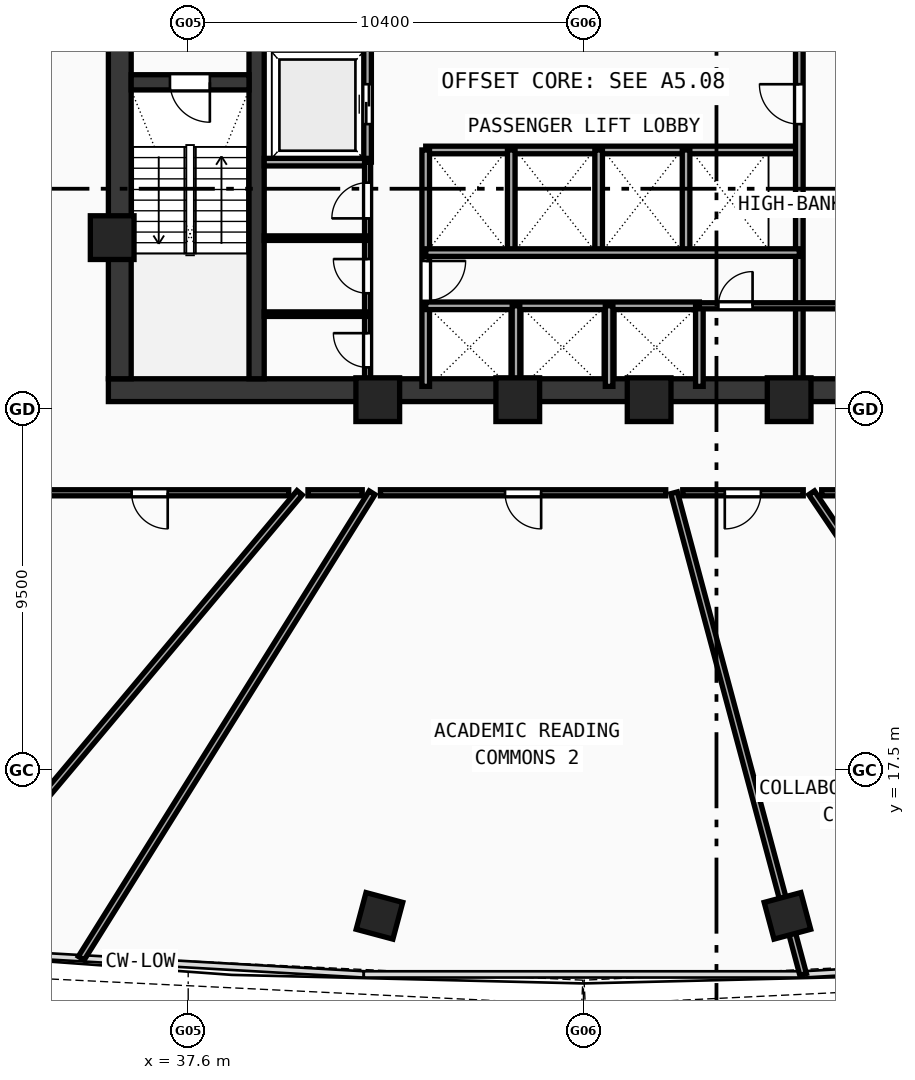
"""IFC4 building model, lengths in metres.
Left out: names, types, materials, properties, quantities, classifications, styles, units other than length and angle.
Written with IfcOpenShell. Run it as: python <this file> out.ifc"""

import sys

from ifc_helpers import new_model, si_unit, direction, frame, frame_2d, origin, origin_with_axes, origin_2d, place, context, subcontext, project, spatial, rectangle, hollow_rectangle, extrude, source, transform, mapped, element, fill, save


model = new_model("IFC4")
c1 = context("Model", 3, precision=1e-05, world=origin(), true_north=direction((0.0, 1.0)))
c2 = subcontext(c1, "Body", "Model", "MODEL_VIEW")
j1 = project(units=[si_unit("LENGTHUNIT", "METRE"), si_unit("PLANEANGLEUNIT", "RADIAN")], contexts=[c1])
p1 = place(None, origin())
s1 = spatial("IfcSite", under=j1, at=p1, CompositionType="ELEMENT")
p2 = place(p1, origin())
s2 = spatial("IfcBuilding", under=s1, at=p2, CompositionType="ELEMENT")
p3 = place(p2, frame((0.0, 0.0, 103.98)))
s3 = spatial("IfcBuildingStorey", under=s2, at=p3, CompositionType="ELEMENT", Elevation=103.98)
p4 = place(p3, frame((35.5, 27.5, 0.0), z_axis=(0.0, 0.0, 1.0), x_axis=(1.0, 0.0, 0.0)))
e1 = element("IfcWall", 1, at=p4, inside=s3, PredefinedType="SHEAR", context=c2, shape_type="SweptSolid", body=[
    extrude(rectangle(XDim=25.0, YDim=0.6, at=frame_2d((12.5, 0.0))), origin(), (0.0, 0.0, 1.0), 3.54),
])
p5 = place(p3, frame((35.8, 27.8, 0.0), z_axis=(0.0, 0.0, 1.0), x_axis=(0.0, 1.0, 0.0)))
e2 = element("IfcWall", 2, at=p5, inside=s3, PredefinedType="SHEAR", context=c2, shape_type="SweptSolid", body=[
    extrude(rectangle(XDim=12.1, YDim=0.6, at=frame_2d((6.05, 0.0))), origin(), (0.0, 0.0, 1.0), 3.54),
])
p6 = place(p3, frame((39.4, 27.8, 0.0), z_axis=(0.0, 0.0, 1.0), x_axis=(0.0, 1.0, 0.0)))
e3 = element("IfcWall", 3, at=p6, inside=s3, PredefinedType="SHEAR", context=c2, shape_type="SweptSolid", body=[
    extrude(rectangle(XDim=12.1, YDim=0.4, at=frame_2d((6.05, 0.0))), origin(), (0.0, 0.0, 1.0), 3.54),
])
p7 = place(p6, frame((9.95, 0.0, 0.0)))
e4 = element("IfcOpeningElement", 4, at=p7, cuts=e3, PredefinedType="OPENING", context=c2, shape_type="SweptSolid", body=[
    extrude(rectangle(XDim=1.1, YDim=2.1, at=frame_2d((0.55, 1.05))), frame((0.0, 0.21, 0.0), z_axis=(0.0, -1.0, 0.0), x_axis=(1.0, 0.0, 0.0)), (0.0, 0.0, 1.0), 0.42),
])
p8 = place(p3, frame((36.1, 35.6, 0.0), z_axis=(0.0, 0.0, 1.0), x_axis=(1.0, 0.0, 0.0)))
e5 = element("IfcWall", 5, at=p8, inside=s3, PredefinedType="SHEAR", context=c2, shape_type="SweptSolid", body=[
    extrude(rectangle(XDim=3.1, YDim=0.4, at=frame_2d((1.55, 0.0))), origin(), (0.0, 0.0, 1.0), 3.54),
])
p9 = place(p8, frame((1.02, 0.0, 0.0)))
e6 = element("IfcOpeningElement", 6, at=p9, cuts=e5, PredefinedType="OPENING", context=c2, shape_type="SweptSolid", body=[
    extrude(rectangle(XDim=1.05, YDim=2.1, at=frame_2d((0.525, 1.05))), frame((0.0, 0.21, 0.0), z_axis=(0.0, -1.0, 0.0), x_axis=(1.0, 0.0, 0.0)), (0.0, 0.0, 1.0), 0.42),
])
m1 = source(origin(), c2, "Body", "SweptSolid", [
    extrude(hollow_rectangle(XDim=1.15, YDim=1.15, WallThickness=0.048, at=origin_2d()), origin(), (0.0, 0.0, 1.0), 3.8),
])
for number, where, z_axis, x_axis in (
    (7, (42.588, 27.25, -0.26), (0.0, 0.0, 1.0), (1.0, 0.0, 0.0)),
    (8, (46.272, 27.25, -0.26), (0.0, 0.0, 1.0), (1.0, 0.0, 0.0)),
    (9, (49.729, 27.25, -0.26), (0.0, 0.0, 1.0), (1.0, 0.0, 0.0)),
    (10, (53.412, 27.25, -0.26), (0.0, 0.0, 1.0), (1.0, 0.0, 0.0)),
    (11, (35.6, 31.513, -0.26), (0.0, 0.0, 1.0), (1.0, 0.0, 0.0)),
):
    element("IfcColumn", number, at=place(p3, frame(where, z_axis=z_axis, x_axis=x_axis)), inside=s3, PredefinedType="COLUMN", context=c2, shape_type="MappedRepresentation", body=[
        mapped(m1, transform((0.0, 0.0, 0.0), scale=1.0)),
    ])
m2 = source(origin(), c2, "Body", "SweptSolid", [
    extrude(hollow_rectangle(XDim=1.0, YDim=1.0, WallThickness=0.042, at=origin_2d()), origin(), (0.0, 0.0, 1.0), 3.8),
])
for number, where, z_axis, x_axis in (
    (12, (42.633, 13.668, -0.26), (0.0, 0.0, 1.0), (0.966, -0.259, 0.0)),
    (13, (53.367, 13.668, -0.26), (0.0, 0.0, 1.0), (0.966, 0.259, 0.0)),
):
    element("IfcColumn", number, at=place(p3, frame(where, z_axis=z_axis, x_axis=x_axis)), inside=s3, PredefinedType="COLUMN", context=c2, shape_type="MappedRepresentation", body=[
        mapped(m2, transform((0.0, 0.0, 0.0), scale=1.0)),
    ])
p10 = place(p3, frame((42.32, 33.5, 0.0), z_axis=(0.0, 0.0, 1.0), x_axis=(0.0, 1.0, 0.0)))
e14 = element("IfcWall", 14, at=p10, inside=s3, PredefinedType="SOLIDWALL", context=c2, shape_type="SweptSolid", body=[
    extrude(rectangle(XDim=6.45, YDim=0.2, at=frame_2d((3.225, 0.0))), origin(), (0.0, 0.0, 1.0), 3.54),
])
p11 = place(p10, frame((1.0, 0.0, 0.0)))
e15 = element("IfcOpeningElement", 15, at=p11, cuts=e14, PredefinedType="OPENING", context=c2, shape_type="SweptSolid", body=[
    extrude(rectangle(XDim=1.05, YDim=2.1, at=frame_2d((0.525, 1.05))), frame((0.0, 0.11, 0.0), z_axis=(0.0, -1.0, 0.0), x_axis=(1.0, 0.0, 0.0)), (0.0, 0.0, 1.0), 0.22),
])
p12 = place(p3, frame((39.6, 33.5, 0.0), z_axis=(0.0, 0.0, 1.0), x_axis=(1.0, 0.0, 0.0)))
e16 = element("IfcWall", 16, at=p12, inside=s3, PredefinedType="SOLIDWALL", context=c2, shape_type="SweptSolid", body=[
    extrude(rectangle(XDim=2.72, YDim=0.2, at=frame_2d((1.36, 0.0))), origin(), (0.0, 0.0, 1.0), 3.54),
])
p13 = place(p3, frame((43.85, 33.82, 0.0), z_axis=(0.0, 0.0, 1.0), x_axis=(1.0, 0.0, 0.0)))
e17 = element("IfcWall", 17, at=p13, inside=s3, PredefinedType="SOLIDWALL", context=c2, shape_type="SweptSolid", body=[
    extrude(rectangle(XDim=9.83, YDim=0.2, at=frame_2d((4.915, 0.0))), origin(), (0.0, 0.0, 1.0), 3.54),
])
p14 = place(p3, frame((43.85, 27.6, 0.0), z_axis=(0.0, 0.0, 1.0), x_axis=(0.0, 1.0, 0.0)))
e18 = element("IfcWall", 18, at=p14, inside=s3, PredefinedType="SOLIDWALL", context=c2, shape_type="SweptSolid", body=[
    extrude(rectangle(XDim=6.22, YDim=0.2, at=frame_2d((3.11, 0.0))), origin(), (0.0, 0.0, 1.0), 3.54),
])
p15 = place(p14, frame((2.25, 0.0, 0.0)))
e19 = element("IfcOpeningElement", 19, at=p15, cuts=e18, PredefinedType="OPENING", context=c2, shape_type="SweptSolid", body=[
    extrude(rectangle(XDim=1.05, YDim=2.1, at=frame_2d((0.525, 1.05))), frame((0.0, 0.11, 0.0), z_axis=(0.0, -1.0, 0.0), x_axis=(1.0, 0.0, 0.0)), (0.0, 0.0, 1.0), 0.22),
])
p16 = place(p3, frame((53.68, 27.6, 0.0), z_axis=(0.0, 0.0, 1.0), x_axis=(0.0, 1.0, 0.0)))
e20 = element("IfcWall", 20, at=p16, inside=s3, PredefinedType="SOLIDWALL", context=c2, shape_type="SweptSolid", body=[
    extrude(rectangle(XDim=9.05, YDim=0.2, at=frame_2d((4.525, 0.0))), origin(), (0.0, 0.0, 1.0), 3.54),
])
p17 = place(p16, frame((6.9, 0.0, 0.0)))
e21 = element("IfcOpeningElement", 21, at=p17, cuts=e20, PredefinedType="OPENING", context=c2, shape_type="SweptSolid", body=[
    extrude(rectangle(XDim=1.05, YDim=2.1, at=frame_2d((0.525, 1.05))), frame((0.0, 0.11, 0.0), z_axis=(0.0, -1.0, 0.0), x_axis=(1.0, 0.0, 0.0)), (0.0, 0.0, 1.0), 0.22),
])
for number, where, z_axis, x_axis in (
    (22, (46.1, 31.12, 0.0), (0.0, 0.0, 1.0), (0.0, 1.0, 0.0)),
    (23, (48.4, 31.12, 0.0), (0.0, 0.0, 1.0), (0.0, 1.0, 0.0)),
    (24, (50.7, 31.12, 0.0), (0.0, 0.0, 1.0), (0.0, 1.0, 0.0)),
):
    element("IfcWall", number, at=place(p3, frame(where, z_axis=z_axis, x_axis=x_axis)), inside=s3, PredefinedType="SOLIDWALL", context=c2, shape_type="SweptSolid", body=[
        extrude(rectangle(XDim=2.7, YDim=0.2, at=frame_2d((1.35, 0.0))), origin(), (0.0, 0.0, 1.0), 3.54),
    ])
p18 = place(p3, frame((43.85, 29.72, 0.0), z_axis=(0.0, 0.0, 1.0), x_axis=(1.0, 0.0, 0.0)))
e25 = element("IfcWall", 25, at=p18, inside=s3, PredefinedType="SOLIDWALL", context=c2, shape_type="SweptSolid", body=[
    extrude(rectangle(XDim=7.2, YDim=0.2, at=frame_2d((3.6, 0.0))), origin(), (0.0, 0.0, 1.0), 3.54),
])
p19 = place(p3, frame((51.05, 27.6, 0.0), z_axis=(0.0, 0.0, 1.0), x_axis=(0.0, 1.0, 0.0)))
e26 = element("IfcWall", 26, at=p19, inside=s3, PredefinedType="SOLIDWALL", context=c2, shape_type="SweptSolid", body=[
    extrude(rectangle(XDim=2.12, YDim=0.2, at=frame_2d((1.06, 0.0))), origin(), (0.0, 0.0, 1.0), 3.54),
])
p20 = place(p3, frame((43.85, 31.12, 0.0), z_axis=(0.0, 0.0, 1.0), x_axis=(1.0, 0.0, 0.0)))
e27 = element("IfcWall", 27, at=p20, inside=s3, PredefinedType="SOLIDWALL", context=c2, shape_type="SweptSolid", body=[
    extrude(rectangle(XDim=9.83, YDim=0.2, at=frame_2d((4.915, 0.0))), origin(), (0.0, 0.0, 1.0), 3.54),
])
for number, where, z_axis, x_axis in (
    (28, (46.225, 27.6, 0.0), (0.0, 0.0, 1.0), (0.0, 1.0, 0.0)),
    (29, (48.675, 27.6, 0.0), (0.0, 0.0, 1.0), (0.0, 1.0, 0.0)),
):
    element("IfcWall", number, at=place(p3, frame(where, z_axis=z_axis, x_axis=x_axis)), inside=s3, PredefinedType="SOLIDWALL", context=c2, shape_type="SweptSolid", body=[
        extrude(rectangle(XDim=2.12, YDim=0.2, at=frame_2d((1.06, 0.0))), origin(), (0.0, 0.0, 1.0), 3.54),
    ])
p21 = place(p3, frame((42.32, 27.6, 0.0), z_axis=(0.0, 0.0, 1.0), x_axis=(0.0, 1.0, 0.0)))
e30 = element("IfcWall", 30, at=p21, inside=s3, PredefinedType="PARTITIONING", context=c2, shape_type="SweptSolid", body=[
    extrude(rectangle(XDim=5.9, YDim=0.16, at=frame_2d((2.95, 0.0))), origin(), (0.0, 0.0, 1.0), 3.54),
])
p22 = place(p21, frame((0.5, 0.0, 0.0)))
e31 = element("IfcOpeningElement", 31, at=p22, cuts=e30, PredefinedType="OPENING", context=c2, shape_type="SweptSolid", body=[
    extrude(rectangle(XDim=0.9, YDim=2.1, at=frame_2d((0.45, 1.05))), frame((0.0, 0.09, 0.0), z_axis=(0.0, -1.0, 0.0), x_axis=(1.0, 0.0, 0.0)), (0.0, 0.0, 1.0), 0.18),
])
p23 = place(p21, frame((2.45, 0.0, 0.0)))
e32 = element("IfcOpeningElement", 32, at=p23, cuts=e30, PredefinedType="OPENING", context=c2, shape_type="SweptSolid", body=[
    extrude(rectangle(XDim=0.9, YDim=2.1, at=frame_2d((0.45, 1.05))), frame((0.0, 0.09, 0.0), z_axis=(0.0, -1.0, 0.0), x_axis=(1.0, 0.0, 0.0)), (0.0, 0.0, 1.0), 0.18),
])
p24 = place(p21, frame((4.42, 0.0, 0.0)))
e33 = element("IfcOpeningElement", 33, at=p24, cuts=e30, PredefinedType="OPENING", context=c2, shape_type="SweptSolid", body=[
    extrude(rectangle(XDim=0.94, YDim=2.1, at=frame_2d((0.47, 1.05))), frame((0.0, 0.09, 0.0), z_axis=(0.0, -1.0, 0.0), x_axis=(1.0, 0.0, 0.0)), (0.0, 0.0, 1.0), 0.18),
])
p25 = place(p3, frame((51.05, 29.72, 0.0), z_axis=(0.0, 0.0, 1.0), x_axis=(1.0, 0.0, 0.0)))
e34 = element("IfcWall", 34, at=p25, inside=s3, PredefinedType="PARTITIONING", context=c2, shape_type="SweptSolid", body=[
    extrude(rectangle(XDim=4.07, YDim=0.16, at=frame_2d((2.035, 0.0))), origin(), (0.0, 0.0, 1.0), 3.54),
])
p26 = place(p25, frame((0.5, 0.0, 0.0)))
e35 = element("IfcOpeningElement", 35, at=p26, cuts=e34, PredefinedType="OPENING", context=c2, shape_type="SweptSolid", body=[
    extrude(rectangle(XDim=0.9, YDim=2.1, at=frame_2d((0.45, 1.05))), frame((0.0, 0.09, 0.0), z_axis=(0.0, -1.0, 0.0), x_axis=(1.0, 0.0, 0.0)), (0.0, 0.0, 1.0), 0.18),
])
for number, where, z_axis, x_axis in (
    (36, (39.6, 29.5, 0.0), (0.0, 0.0, 1.0), (1.0, 0.0, 0.0)),
    (37, (39.6, 31.5, 0.0), (0.0, 0.0, 1.0), (1.0, 0.0, 0.0)),
):
    element("IfcWall", number, at=place(p3, frame(where, z_axis=z_axis, x_axis=x_axis)), inside=s3, PredefinedType="PARTITIONING", context=c2, shape_type="SweptSolid", body=[
        extrude(rectangle(XDim=2.72, YDim=0.12, at=frame_2d((1.36, 0.0))), origin(), (0.0, 0.0, 1.0), 3.54),
    ])
p27 = place(p3, frame((40.532, 24.8, 0.0), z_axis=(0.0, 0.0, 1.0), x_axis=(-0.642779306778, -0.76605141001, 0.0)))
e38 = element("IfcWall", 38, at=p27, inside=s3, PredefinedType="PARTITIONING", context=c2, shape_type="SweptSolid", body=[
    extrude(rectangle(XDim=15.664, YDim=0.18, at=frame_2d((7.832, 0.0))), origin(), (0.0, 0.0, 1.0), 2.84),
])
p28 = place(p3, frame((42.439, 24.8, 0.0), z_axis=(0.0, 0.0, 1.0), x_axis=(-0.529922955224, -0.848045789758, 0.0)))
e39 = element("IfcWall", 39, at=p28, inside=s3, PredefinedType="PARTITIONING", context=c2, shape_type="SweptSolid", body=[
    extrude(rectangle(XDim=14.441, YDim=0.18, at=frame_2d((7.22, 0.0))), origin(), (0.0, 0.0, 1.0), 2.84),
])
p29 = place(p3, frame((50.385, 24.8, 0.0), z_axis=(0.0, 0.0, 1.0), x_axis=(0.258820732199, -0.965925374231, 0.0)))
e40 = element("IfcWall", 40, at=p29, inside=s3, PredefinedType="PARTITIONING", context=c2, shape_type="SweptSolid", body=[
    extrude(rectangle(XDim=13.119, YDim=0.18, at=frame_2d((6.56, 0.0))), origin(), (0.0, 0.0, 1.0), 2.84),
])
p30 = place(p3, frame((54.003, 24.8, 0.0), z_axis=(0.0, 0.0, 1.0), x_axis=(0.559194755778, -0.829036323155, 0.0)))
e41 = element("IfcWall", 41, at=p30, inside=s3, PredefinedType="PARTITIONING", context=c2, shape_type="SweptSolid", body=[
    extrude(rectangle(XDim=14.702, YDim=0.18, at=frame_2d((7.351, 0.0))), origin(), (0.0, 0.0, 1.0), 2.84),
])
p31 = place(p3, frame((55.248, 24.8, 0.0), z_axis=(0.0, 0.0, 1.0), x_axis=(-1.0, 0.0, 0.0)))
e42 = element("IfcWall", 42, at=p31, inside=s3, PredefinedType="PARTITIONING", context=c2, shape_type="SweptSolid", body=[
    extrude(rectangle(XDim=0.979, YDim=0.16, at=frame_2d((0.49, 0.0))), origin(), (0.0, 0.0, 1.0), 2.84),
])
p32 = place(p3, frame((53.783, 24.8, 0.0), z_axis=(0.0, 0.0, 1.0), x_axis=(-1.0, 0.0, 0.0)))
e43 = element("IfcWall", 43, at=p32, inside=s3, PredefinedType="PARTITIONING", context=c2, shape_type="SweptSolid", body=[
    extrude(rectangle(XDim=3.171, YDim=0.16, at=frame_2d((1.585, 0.0))), origin(), (0.0, 0.0, 1.0), 3.54),
])
p33 = place(p32, frame((1.114, 0.0, 0.0)))
e44 = element("IfcOpeningElement", 44, at=p33, cuts=e43, PredefinedType="OPENING", context=c2, shape_type="SweptSolid", body=[
    extrude(rectangle(XDim=0.95, YDim=2.1, at=frame_2d((0.475, 1.05))), frame((0.0, 0.09, 0.0), z_axis=(0.0, -1.0, 0.0), x_axis=(1.0, 0.0, 0.0)), (0.0, 0.0, 1.0), 0.18),
])
p34 = place(p3, frame((50.165, 24.8, 0.0), z_axis=(0.0, 0.0, 1.0), x_axis=(-1.0, 0.0, 0.0)))
e45 = element("IfcWall", 45, at=p34, inside=s3, PredefinedType="PARTITIONING", context=c2, shape_type="SweptSolid", body=[
    extrude(rectangle(XDim=7.506, YDim=0.16, at=frame_2d((3.753, 0.0))), origin(), (0.0, 0.0, 1.0), 2.84),
])
p35 = place(p34, frame((3.278, 0.0, 0.0)))
e46 = element("IfcOpeningElement", 46, at=p35, cuts=e45, PredefinedType="OPENING", context=c2, shape_type="SweptSolid", body=[
    extrude(rectangle(XDim=0.95, YDim=2.1, at=frame_2d((0.475, 1.05))), frame((0.0, 0.09, 0.0), z_axis=(0.0, -1.0, 0.0), x_axis=(1.0, 0.0, 0.0)), (0.0, 0.0, 1.0), 0.18),
])
p36 = place(p3, frame((42.179, 24.8, 0.0), z_axis=(0.0, 0.0, 1.0), x_axis=(-1.0, 0.0, 0.0)))
e47 = element("IfcWall", 47, at=p36, inside=s3, PredefinedType="PARTITIONING", context=c2, shape_type="SweptSolid", body=[
    extrude(rectangle(XDim=1.427, YDim=0.16, at=frame_2d((0.714, 0.0))), origin(), (0.0, 0.0, 1.0), 2.84),
])
p37 = place(p3, frame((40.245, 24.8, 0.0), z_axis=(0.0, 0.0, 1.0), x_axis=(-1.0, 0.0, 0.0)))
e48 = element("IfcWall", 48, at=p37, inside=s3, PredefinedType="PARTITIONING", context=c2, shape_type="SweptSolid", body=[
    extrude(rectangle(XDim=7.145, YDim=0.16, at=frame_2d((3.572, 0.0))), origin(), (0.0, 0.0, 1.0), 3.14),
])
p38 = place(p37, frame((3.184, 0.0, 0.0)))
e49 = element("IfcOpeningElement", 49, at=p38, cuts=e48, PredefinedType="OPENING", context=c2, shape_type="SweptSolid", body=[
    extrude(rectangle(XDim=0.95, YDim=2.1, at=frame_2d((0.475, 1.05))), frame((0.0, 0.09, 0.0), z_axis=(0.0, -1.0, 0.0), x_axis=(1.0, 0.0, 0.0)), (0.0, 0.0, 1.0), 0.18),
])
m3 = source(origin(), c2, "Body", "SweptSolid", [
    extrude(rectangle(XDim=1.05, YDim=2.1, at=frame_2d((0.525, 1.05))), frame((0.0, 0.025, 0.0), z_axis=(0.0, -1.0, 0.0), x_axis=(1.0, 0.0, 0.0)), (0.0, 0.0, 1.0), 0.05),
])
p39 = place(p9, frame((1.05, 0.0, 0.0), z_axis=(0.0, 0.0, 1.0), x_axis=(-1.0, 0.0, 0.0)))
e50 = element("IfcDoor", 50, at=p39, inside=s3, OperationType="SINGLE_SWING_LEFT", PredefinedType="DOOR", context=c2, shape_type="MappedRepresentation", body=[
    mapped(m3, transform((0.0, 0.0, 0.0), scale=1.0)),
])
fill(e6, e50)
p40 = place(p11, origin_with_axes())
e51 = element("IfcDoor", 51, at=p40, inside=s3, OperationType="DOUBLE_DOOR_SLIDING", PredefinedType="DOOR", context=c2, shape_type="MappedRepresentation", body=[
    mapped(m3, transform((0.0, 0.0, 0.0), scale=1.0)),
])
fill(e15, e51)
p41 = place(p15, frame((1.05, 0.0, 0.0), z_axis=(0.0, 0.0, 1.0), x_axis=(-1.0, 0.0, 0.0)))
e52 = element("IfcDoor", 52, at=p41, inside=s3, OperationType="SINGLE_SWING_LEFT", PredefinedType="DOOR", context=c2, shape_type="MappedRepresentation", body=[
    mapped(m3, transform((0.0, 0.0, 0.0), scale=1.0)),
])
fill(e19, e52)
p42 = place(p17, origin_with_axes())
e53 = element("IfcDoor", 53, at=p42, inside=s3, OperationType="SINGLE_SWING_RIGHT", PredefinedType="DOOR", context=c2, shape_type="MappedRepresentation", body=[
    mapped(m3, transform((0.0, 0.0, 0.0), scale=1.0)),
])
fill(e21, e53)
m4 = source(origin(), c2, "Body", "SweptSolid", [
    extrude(rectangle(XDim=0.9, YDim=2.1, at=frame_2d((0.45, 1.05))), frame((0.0, 0.025, 0.0), z_axis=(0.0, -1.0, 0.0), x_axis=(1.0, 0.0, 0.0)), (0.0, 0.0, 1.0), 0.05),
])
p43 = place(p22, origin_with_axes())
e54 = element("IfcDoor", 54, at=p43, inside=s3, OperationType="SINGLE_SWING_RIGHT", PredefinedType="DOOR", context=c2, shape_type="MappedRepresentation", body=[
    mapped(m4, transform((0.0, 0.0, 0.0), scale=1.0)),
])
fill(e31, e54)
p44 = place(p23, origin_with_axes())
e55 = element("IfcDoor", 55, at=p44, inside=s3, OperationType="SINGLE_SWING_RIGHT", PredefinedType="DOOR", context=c2, shape_type="MappedRepresentation", body=[
    mapped(m4, transform((0.0, 0.0, 0.0), scale=1.0)),
])
fill(e32, e55)
m5 = source(origin(), c2, "Body", "SweptSolid", [
    extrude(rectangle(XDim=0.94, YDim=2.1, at=frame_2d((0.47, 1.05))), frame((0.0, 0.025, 0.0), z_axis=(0.0, -1.0, 0.0), x_axis=(1.0, 0.0, 0.0)), (0.0, 0.0, 1.0), 0.05),
])
p45 = place(p24, origin_with_axes())
e56 = element("IfcDoor", 56, at=p45, inside=s3, OperationType="SINGLE_SWING_LEFT", PredefinedType="DOOR", context=c2, shape_type="MappedRepresentation", body=[
    mapped(m5, transform((0.0, 0.0, 0.0), scale=1.0)),
])
fill(e33, e56)
p46 = place(p26, origin_with_axes())
e57 = element("IfcDoor", 57, at=p46, inside=s3, OperationType="SINGLE_SWING_RIGHT", PredefinedType="DOOR", context=c2, shape_type="MappedRepresentation", body=[
    mapped(m4, transform((0.0, 0.0, 0.0), scale=1.0)),
])
fill(e35, e57)
m6 = source(origin(), c2, "Body", "SweptSolid", [
    extrude(rectangle(XDim=0.95, YDim=2.1, at=frame_2d((0.475, 1.05))), frame((0.0, 0.025, 0.0), z_axis=(0.0, -1.0, 0.0), x_axis=(1.0, 0.0, 0.0)), (0.0, 0.0, 1.0), 0.05),
])
p47 = place(p38, origin_with_axes())
e58 = element("IfcDoor", 58, at=p47, inside=s3, OperationType="SINGLE_SWING_LEFT", PredefinedType="DOOR", context=c2, shape_type="MappedRepresentation", body=[
    mapped(m6, transform((0.0, 0.0, 0.0), scale=1.0)),
])
fill(e49, e58)
p48 = place(p35, origin_with_axes())
e59 = element("IfcDoor", 59, at=p48, inside=s3, OperationType="SINGLE_SWING_LEFT", PredefinedType="DOOR", context=c2, shape_type="MappedRepresentation", body=[
    mapped(m6, transform((0.0, 0.0, 0.0), scale=1.0)),
])
fill(e46, e59)
p49 = place(p33, origin_with_axes())
e60 = element("IfcDoor", 60, at=p49, inside=s3, OperationType="SINGLE_SWING_RIGHT", PredefinedType="DOOR", context=c2, shape_type="MappedRepresentation", body=[
    mapped(m6, transform((0.0, 0.0, 0.0), scale=1.0)),
])
fill(e44, e60)
save(model, sys.argv[1])
